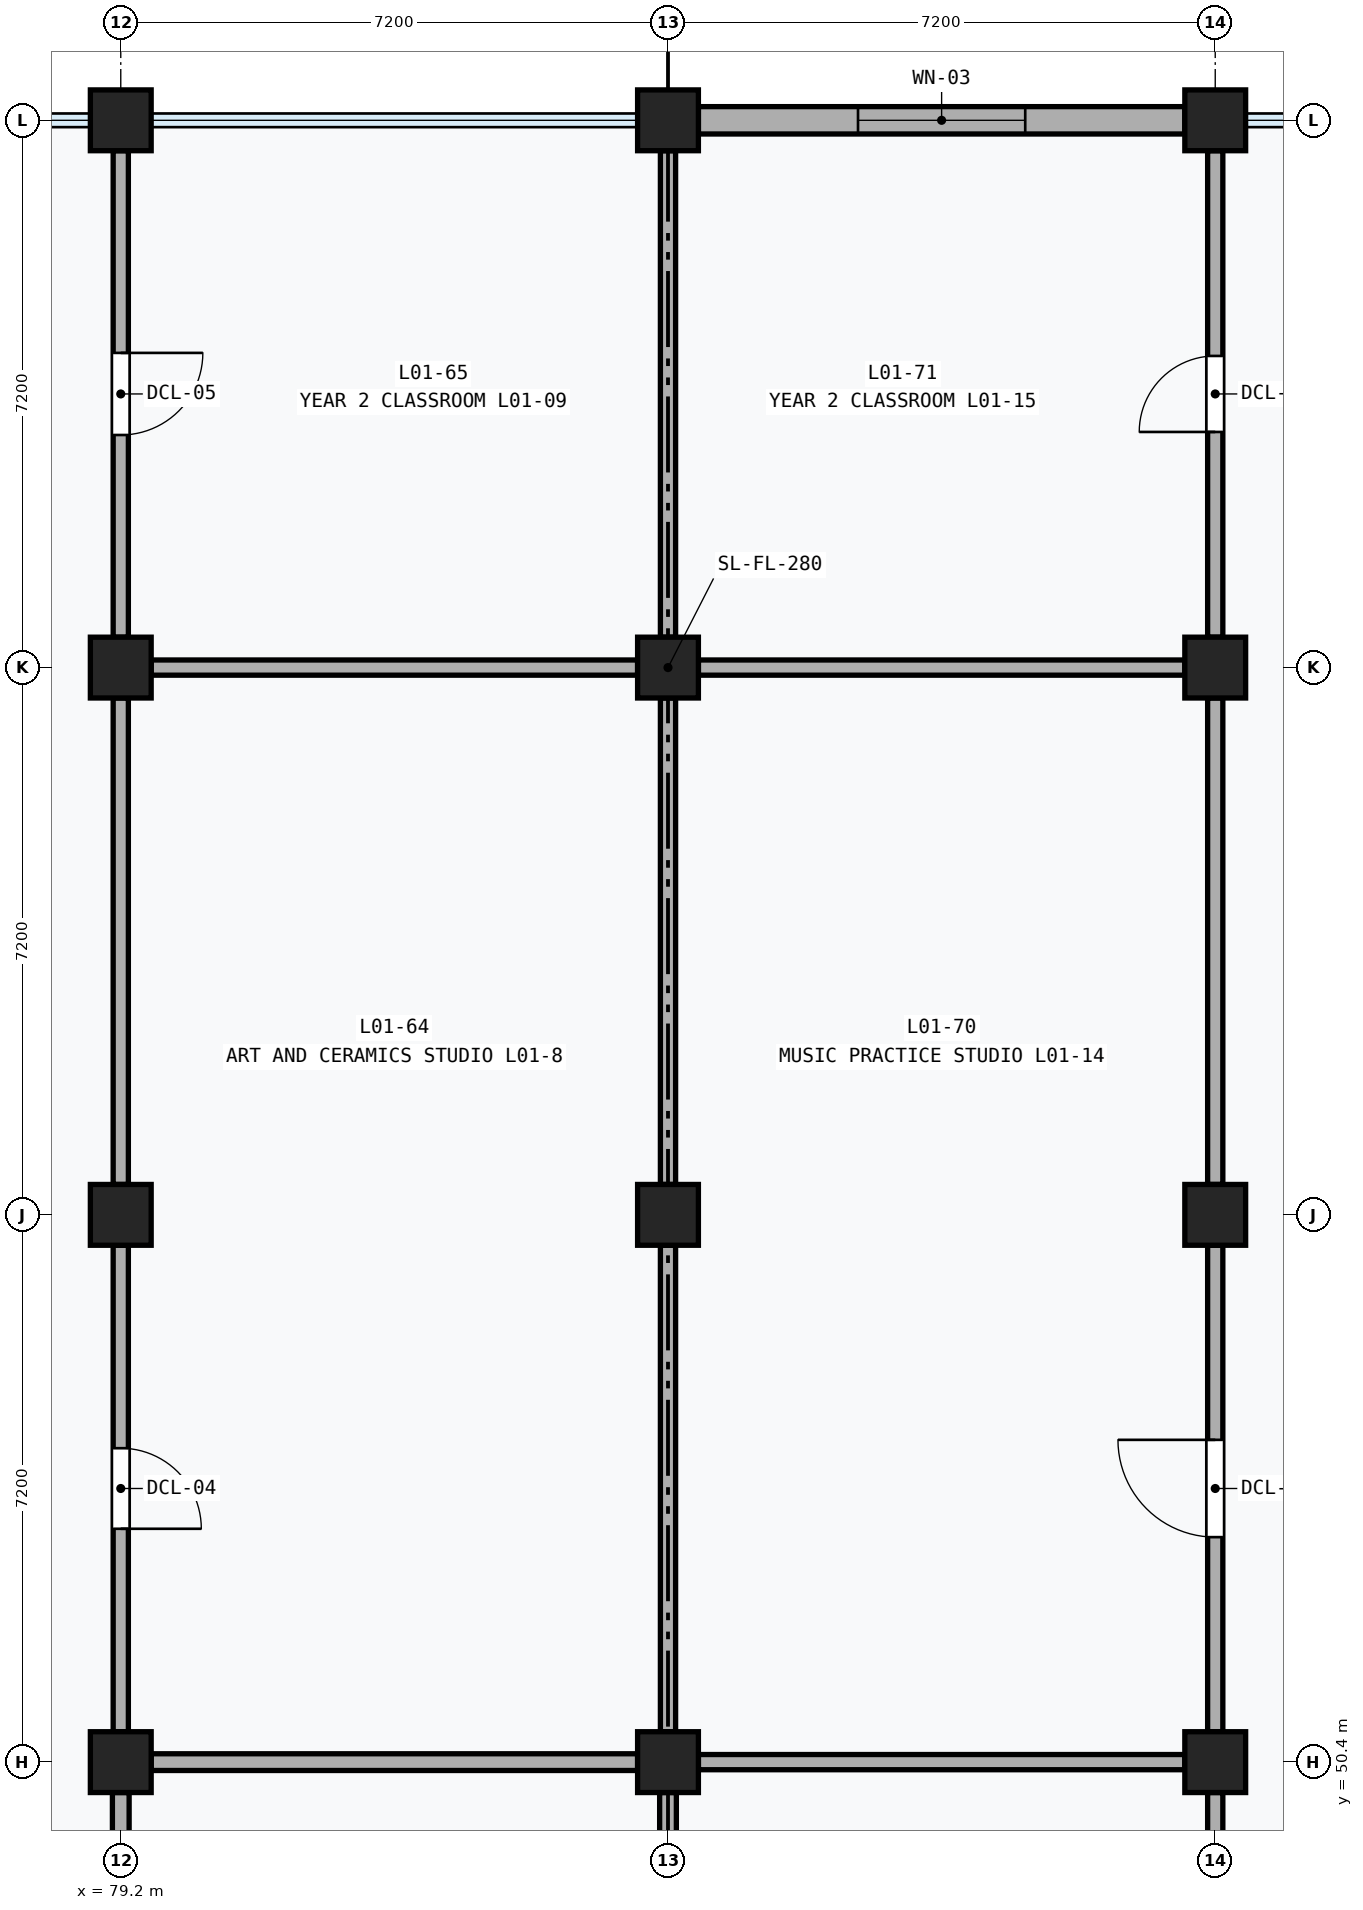
"""IFC4 building model, lengths in metres.
Left out: names, types, materials, properties, quantities, classifications, styles, units other than length and angle.
Written with IfcOpenShell. Run it as: python <this file> out.ifc"""

import sys

from ifc_helpers import new_model, si_unit, direction, frame, frame_2d, origin, origin_2d, place, context, subcontext, project, spatial, rectangle, extrude, element, fill, save


model = new_model("IFC4")
c1 = context("Model", 3, precision=1e-05, world=origin(), true_north=direction((0.0, 1.0)))
c2 = subcontext(c1, "Body", "Model", "MODEL_VIEW")
j1 = project(units=[si_unit("LENGTHUNIT", "METRE"), si_unit("PLANEANGLEUNIT", "RADIAN")], contexts=[c1])
p1 = place(None, origin())
s1 = spatial("IfcSite", under=j1, at=p1, CompositionType="ELEMENT")
p2 = place(p1, origin())
s2 = spatial("IfcBuilding", under=s1, at=p2, CompositionType="ELEMENT")
p3 = place(p2, frame((0.0, 0.0, 4.8)))
s3 = spatial("IfcBuildingStorey", under=s2, at=p3, CompositionType="ELEMENT", Elevation=4.8)
for number, where, z_axis, x_axis in (
    (1, (79.2, 50.4, 0.0), (0.0, 0.0, 1.0), (1.0, 0.0, 0.0)),
    (2, (79.2, 57.6, 0.0), (0.0, 0.0, 1.0), (1.0, 0.0, 0.0)),
    (3, (79.2, 64.8, 0.0), (0.0, 0.0, 1.0), (1.0, 0.0, 0.0)),
    (4, (79.2, 72.0, 0.0), (0.0, 0.0, 1.0), (1.0, 0.0, 0.0)),
    (5, (86.4, 50.4, 0.0), (0.0, 0.0, 1.0), (1.0, 0.0, 0.0)),
    (6, (86.4, 57.6, 0.0), (0.0, 0.0, 1.0), (1.0, 0.0, 0.0)),
    (7, (86.4, 64.8, 0.0), (0.0, 0.0, 1.0), (1.0, 0.0, 0.0)),
    (8, (86.4, 72.0, 0.0), (0.0, 0.0, 1.0), (1.0, 0.0, 0.0)),
    (9, (93.6, 50.4, 0.0), (0.0, 0.0, 1.0), (1.0, 0.0, 0.0)),
    (10, (93.6, 57.6, 0.0), (0.0, 0.0, 1.0), (1.0, 0.0, 0.0)),
    (11, (93.6, 64.8, 0.0), (0.0, 0.0, 1.0), (1.0, 0.0, 0.0)),
    (12, (93.6, 72.0, 0.0), (0.0, 0.0, 1.0), (1.0, 0.0, 0.0)),
):
    element("IfcColumn", number, at=place(p3, frame(where, z_axis=z_axis, x_axis=x_axis)), inside=s3, PredefinedType="COLUMN", context=c2, shape_type="SweptSolid", body=[
        extrude(rectangle(XDim=0.8, YDim=0.8, at=origin_2d()), origin(), (0.0, 0.0, 1.0), 4.8),
    ])
p4 = place(p3, frame((86.8, 72.0, 0.0), z_axis=(0.0, 0.0, 1.0), x_axis=(1.0, 0.0, 0.0)))
e13 = element("IfcWall", 13, at=p4, inside=s3, PredefinedType="SOLIDWALL", context=c2, shape_type="SweptSolid", body=[
    extrude(rectangle(XDim=6.4, YDim=0.36, at=frame_2d((3.2, 0.0))), origin(), (0.0, 0.0, 1.0), 3.85),
])
p5 = place(p4, frame((2.1, 0.0, 0.9)))
e14 = element("IfcOpeningElement", 14, at=p5, cuts=e13, PredefinedType="OPENING", context=c2, shape_type="SweptSolid", body=[
    extrude(rectangle(XDim=2.2, YDim=1.8, at=frame_2d((1.1, 0.9))), frame((0.0, 0.192, 0.0), z_axis=(0.0, -1.0, 0.0), x_axis=(1.0, 0.0, 0.0)), (0.0, 0.0, 1.0), 0.384),
])
for number, where, z_axis, x_axis in (
    (15, (79.6, 50.4, 0.0), (0.0, 0.0, 1.0), (1.0, 0.0, 0.0)),
    (16, (79.2, 43.6, 0.0), (0.0, 0.0, 1.0), (0.0, 1.0, 0.0)),
    (17, (86.4, 43.6, 0.0), (0.0, 0.0, 1.0), (0.0, 1.0, 0.0)),
):
    element("IfcWall", number, at=place(p3, frame(where, z_axis=z_axis, x_axis=x_axis)), inside=s3, PredefinedType="PARTITIONING", context=c2, shape_type="SweptSolid", body=[
        extrude(rectangle(XDim=6.4, YDim=0.22, at=frame_2d((3.2, 0.0))), origin(), (0.0, 0.0, 1.0), 3.58),
    ])
p6 = place(p3, frame((79.2, 50.8, 0.0), z_axis=(0.0, 0.0, 1.0), x_axis=(0.0, 1.0, 0.0)))
e18 = element("IfcWall", 18, at=p6, inside=s3, PredefinedType="PARTITIONING", context=c2, shape_type="SweptSolid", body=[
    extrude(rectangle(XDim=6.4, YDim=0.2, at=frame_2d((3.2, 0.0))), origin(), (0.0, 0.0, 1.0), 3.58),
])
p7 = place(p6, frame((2.67, 0.0, 0.0)))
e19 = element("IfcOpeningElement", 19, at=p7, cuts=e18, PredefinedType="OPENING", context=c2, shape_type="SweptSolid", body=[
    extrude(rectangle(XDim=1.06, YDim=2.16, at=frame_2d((0.53, 1.08))), frame((0.0, 0.112, 0.0), z_axis=(0.0, -1.0, 0.0), x_axis=(1.0, 0.0, 0.0)), (0.0, 0.0, 1.0), 0.224),
])
for number, where, z_axis, x_axis in (
    (20, (86.4, 50.8, 0.0), (0.0, 0.0, 1.0), (0.0, 1.0, 0.0)),
    (21, (79.6, 64.8, 0.0), (0.0, 0.0, 1.0), (1.0, 0.0, 0.0)),
    (22, (79.2, 58.0, 0.0), (0.0, 0.0, 1.0), (0.0, 1.0, 0.0)),
    (23, (86.4, 58.0, 0.0), (0.0, 0.0, 1.0), (0.0, 1.0, 0.0)),
):
    element("IfcWall", number, at=place(p3, frame(where, z_axis=z_axis, x_axis=x_axis)), inside=s3, PredefinedType="PARTITIONING", context=c2, shape_type="SweptSolid", body=[
        extrude(rectangle(XDim=6.4, YDim=0.2, at=frame_2d((3.2, 0.0))), origin(), (0.0, 0.0, 1.0), 3.58),
    ])
p8 = place(p3, frame((79.2, 65.2, 0.0), z_axis=(0.0, 0.0, 1.0), x_axis=(0.0, 1.0, 0.0)))
e24 = element("IfcWall", 24, at=p8, inside=s3, PredefinedType="PARTITIONING", context=c2, shape_type="SweptSolid", body=[
    extrude(rectangle(XDim=6.4, YDim=0.2, at=frame_2d((3.2, 0.0))), origin(), (0.0, 0.0, 1.0), 3.58),
])
p9 = place(p8, frame((2.66, 0.0, 0.0)))
e25 = element("IfcOpeningElement", 25, at=p9, cuts=e24, PredefinedType="OPENING", context=c2, shape_type="SweptSolid", body=[
    extrude(rectangle(XDim=1.08, YDim=2.18, at=frame_2d((0.54, 1.09))), frame((0.0, 0.112, 0.0), z_axis=(0.0, -1.0, 0.0), x_axis=(1.0, 0.0, 0.0)), (0.0, 0.0, 1.0), 0.224),
])
p10 = place(p3, frame((86.4, 65.2, 0.0), z_axis=(0.0, 0.0, 1.0), x_axis=(0.0, 1.0, 0.0)))
e26 = element("IfcWall", 26, at=p10, inside=s3, PredefinedType="PARTITIONING", context=c2, shape_type="SweptSolid", body=[
    extrude(rectangle(XDim=6.4, YDim=0.2, at=frame_2d((3.2, 0.0))), origin(), (0.0, 0.0, 1.0), 3.58),
])
for number, where, z_axis, x_axis in (
    (27, (86.8, 50.4, 0.0), (0.0, 0.0, 1.0), (1.0, 0.0, 0.0)),
    (28, (93.6, 43.6, 0.0), (0.0, 0.0, 1.0), (0.0, 1.0, 0.0)),
):
    element("IfcWall", number, at=place(p3, frame(where, z_axis=z_axis, x_axis=x_axis)), inside=s3, PredefinedType="PARTITIONING", context=c2, shape_type="SweptSolid", body=[
        extrude(rectangle(XDim=6.4, YDim=0.2, at=frame_2d((3.2, 0.0))), origin(), (0.0, 0.0, 1.0), 3.58),
    ])
p11 = place(p3, frame((93.6, 50.8, 0.0), z_axis=(0.0, 0.0, 1.0), x_axis=(0.0, 1.0, 0.0)))
e29 = element("IfcWall", 29, at=p11, inside=s3, PredefinedType="PARTITIONING", context=c2, shape_type="SweptSolid", body=[
    extrude(rectangle(XDim=6.4, YDim=0.2, at=frame_2d((3.2, 0.0))), origin(), (0.0, 0.0, 1.0), 3.58),
])
p12 = place(p11, frame((2.56, 0.0, 0.0)))
e30 = element("IfcOpeningElement", 30, at=p12, cuts=e29, PredefinedType="OPENING", context=c2, shape_type="SweptSolid", body=[
    extrude(rectangle(XDim=1.28, YDim=2.28, at=frame_2d((0.64, 1.14))), frame((0.0, 0.112, 0.0), z_axis=(0.0, -1.0, 0.0), x_axis=(1.0, 0.0, 0.0)), (0.0, 0.0, 1.0), 0.224),
])
for number, where, z_axis, x_axis in (
    (31, (86.8, 64.8, 0.0), (0.0, 0.0, 1.0), (1.0, 0.0, 0.0)),
    (32, (93.6, 58.0, 0.0), (0.0, 0.0, 1.0), (0.0, 1.0, 0.0)),
):
    element("IfcWall", number, at=place(p3, frame(where, z_axis=z_axis, x_axis=x_axis)), inside=s3, PredefinedType="PARTITIONING", context=c2, shape_type="SweptSolid", body=[
        extrude(rectangle(XDim=6.4, YDim=0.2, at=frame_2d((3.2, 0.0))), origin(), (0.0, 0.0, 1.0), 3.58),
    ])
p13 = place(p3, frame((93.6, 65.2, 0.0), z_axis=(0.0, 0.0, 1.0), x_axis=(0.0, 1.0, 0.0)))
e33 = element("IfcWall", 33, at=p13, inside=s3, PredefinedType="PARTITIONING", context=c2, shape_type="SweptSolid", body=[
    extrude(rectangle(XDim=6.4, YDim=0.2, at=frame_2d((3.2, 0.0))), origin(), (0.0, 0.0, 1.0), 3.58),
])
p14 = place(p13, frame((2.7, 0.0, 0.0)))
e34 = element("IfcOpeningElement", 34, at=p14, cuts=e33, PredefinedType="OPENING", context=c2, shape_type="SweptSolid", body=[
    extrude(rectangle(XDim=1.0, YDim=2.1, at=frame_2d((0.5, 1.05))), frame((0.0, 0.112, 0.0), z_axis=(0.0, -1.0, 0.0), x_axis=(1.0, 0.0, 0.0)), (0.0, 0.0, 1.0), 0.224),
])
p15 = place(p5, origin())
e35 = element("IfcWindow", 35, at=p15, inside=s3, PartitioningType="SINGLE_PANEL", PredefinedType="WINDOW", context=c2, shape_type="SweptSolid", body=[
    extrude(rectangle(XDim=2.2, YDim=1.8, at=frame_2d((1.1, 0.9))), frame((0.0, 0.03, 0.0), z_axis=(0.0, -1.0, 0.0), x_axis=(1.0, 0.0, 0.0)), (0.0, 0.0, 1.0), 0.06),
])
fill(e14, e35)
p16 = place(p7, frame((1.06, 0.0, 0.0), z_axis=(0.0, 0.0, 1.0), x_axis=(-1.0, 0.0, 0.0)))
e36 = element("IfcDoor", 36, at=p16, inside=s3, OperationType="SINGLE_SWING_RIGHT", PredefinedType="DOOR", context=c2, shape_type="SweptSolid", body=[
    extrude(rectangle(XDim=1.06, YDim=2.16, at=frame_2d((0.53, 1.08))), frame((0.0, 0.025, 0.0), z_axis=(0.0, -1.0, 0.0), x_axis=(1.0, 0.0, 0.0)), (0.0, 0.0, 1.0), 0.05),
])
fill(e19, e36)
p17 = place(p9, frame((1.08, 0.0, 0.0), z_axis=(0.0, 0.0, 1.0), x_axis=(-1.0, 0.0, 0.0)))
e37 = element("IfcDoor", 37, at=p17, inside=s3, OperationType="SINGLE_SWING_LEFT", PredefinedType="DOOR", context=c2, shape_type="SweptSolid", body=[
    extrude(rectangle(XDim=1.08, YDim=2.18, at=frame_2d((0.54, 1.09))), frame((0.0, 0.025, 0.0), z_axis=(0.0, -1.0, 0.0), x_axis=(1.0, 0.0, 0.0)), (0.0, 0.0, 1.0), 0.05),
])
fill(e25, e37)
p18 = place(p12, origin())
e38 = element("IfcDoor", 38, at=p18, inside=s3, OperationType="SINGLE_SWING_RIGHT", PredefinedType="DOOR", context=c2, shape_type="SweptSolid", body=[
    extrude(rectangle(XDim=1.28, YDim=2.28, at=frame_2d((0.64, 1.14))), frame((0.0, 0.025, 0.0), z_axis=(0.0, -1.0, 0.0), x_axis=(1.0, 0.0, 0.0)), (0.0, 0.0, 1.0), 0.05),
])
fill(e30, e38)
p19 = place(p14, origin())
e39 = element("IfcDoor", 39, at=p19, inside=s3, OperationType="SINGLE_SWING_LEFT", PredefinedType="DOOR", context=c2, shape_type="SweptSolid", body=[
    extrude(rectangle(XDim=1.0, YDim=2.1, at=frame_2d((0.5, 1.05))), frame((0.0, 0.025, 0.0), z_axis=(0.0, -1.0, 0.0), x_axis=(1.0, 0.0, 0.0)), (0.0, 0.0, 1.0), 0.05),
])
fill(e34, e39)
save(model, sys.argv[1])
